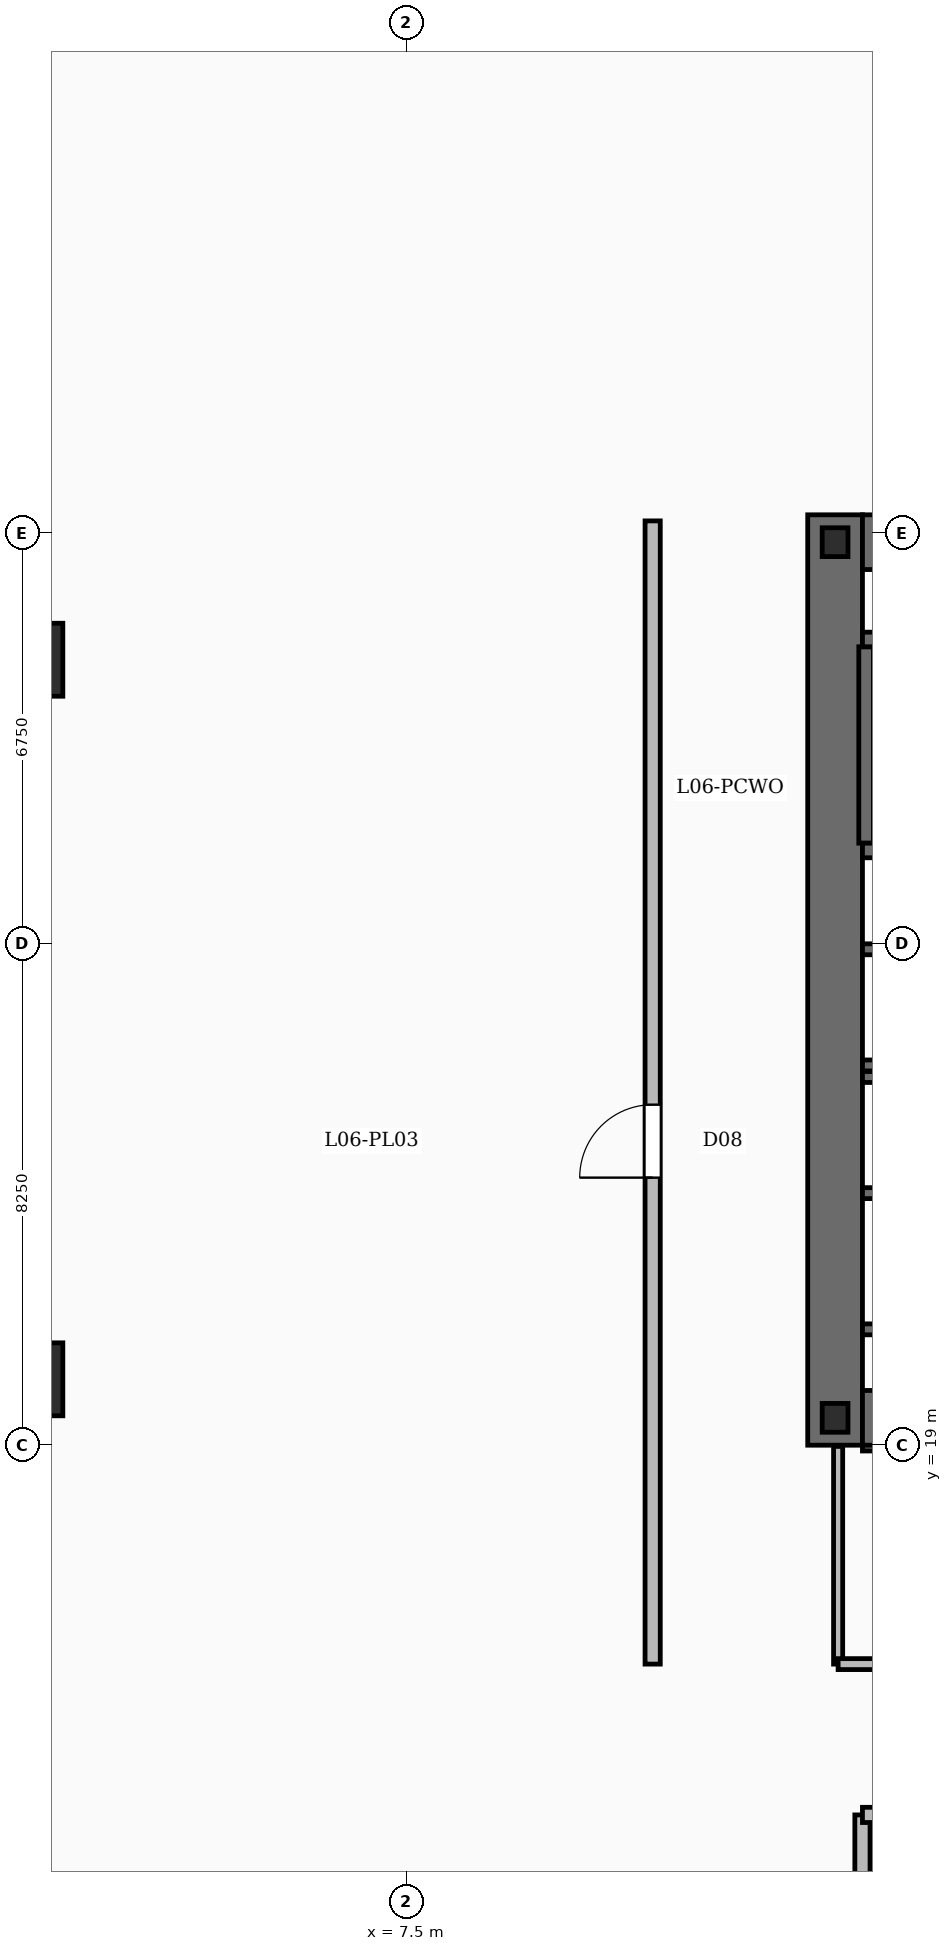
"""IFC4 building model, lengths in metres.
Left out: names, types, materials, properties, quantities, classifications, styles, units other than length and angle.
Written with IfcOpenShell. Run it as: python <this file> out.ifc"""

import sys

from ifc_helpers import new_model, si_unit, direction, frame, frame_2d, origin, origin_2d, place, context, subcontext, project, spatial, rectangle, i_section, extrude, element, fill, save


model = new_model("IFC4")
c1 = context("Model", 3, precision=1e-05, world=origin(), true_north=direction((0.0, 1.0)))
c2 = subcontext(c1, "Body", "Model", "MODEL_VIEW")
j1 = project(units=[si_unit("LENGTHUNIT", "METRE"), si_unit("PLANEANGLEUNIT", "RADIAN")], contexts=[c1])
p1 = place(None, origin())
s1 = spatial("IfcSite", under=j1, at=p1, CompositionType="ELEMENT")
p2 = place(p1, origin())
s2 = spatial("IfcBuilding", under=s1, at=p2, CompositionType="ELEMENT")
p3 = place(p2, frame((0.0, 0.0, 34.0)))
s3 = spatial("IfcBuildingStorey", under=s2, at=p3, CompositionType="ELEMENT", Elevation=34.0)
p4 = place(p3, frame((14.55, 19.0, -0.45), z_axis=(0.0, 0.0, 1.0), x_axis=(0.0, 1.0, 0.0)))
e1 = element("IfcWall", 1, at=p4, inside=s3, PredefinedType="SHEAR", context=c2, shape_type="SweptSolid", body=[
    extrude(rectangle(XDim=15.3, YDim=0.9, at=frame_2d((7.65, 0.0))), origin(), (0.0, 0.0, 1.0), 8.0),
])
for number, where, z_axis, x_axis in (
    (2, (15.0, 19.45, -0.45), (0.0, 0.0, 1.0), (1.0, 0.0, 0.0)),
    (3, (15.0, 33.85, -0.45), (0.0, 0.0, 1.0), (1.0, 0.0, 0.0)),
):
    element("IfcWall", number, at=place(p3, frame(where, z_axis=z_axis, x_axis=x_axis)), inside=s3, PredefinedType="SHEAR", context=c2, shape_type="SweptSolid", body=[
        extrude(rectangle(XDim=8.9, YDim=0.9, at=frame_2d((4.45, 0.0))), origin(), (0.0, 0.0, 1.0), 8.0),
    ])
for number, where, z_axis, x_axis in (
    (4, (14.55, 19.45, -0.45), (0.0, 0.0, 1.0), (1.0, 0.0, 0.0)),
    (5, (14.55, 33.85, -0.45), (0.0, 0.0, 1.0), (1.0, 0.0, 0.0)),
):
    element("IfcColumn", number, at=place(p3, frame(where, z_axis=z_axis, x_axis=x_axis)), inside=s3, PredefinedType="COLUMN", context=c2, shape_type="SweptSolid", body=[
        extrude(i_section(OverallWidth=0.424, OverallDepth=0.474, WebThickness=0.048, FlangeThickness=0.077, FilletRadius=0.02, at=origin_2d()), origin(), (0.0, 0.0, 1.0), 8.0),
    ])
for number, where, z_axis, x_axis in (
    (6, (1.4, 31.917, -0.45), (0.0, 0.0, 1.0), (0.0, 1.0, 0.0)),
    (7, (1.4, 20.083, -0.45), (0.0, 0.0, 1.0), (0.0, 1.0, 0.0)),
):
    element("IfcColumn", number, at=place(p3, frame(where, z_axis=z_axis, x_axis=x_axis)), inside=s3, PredefinedType="COLUMN", context=c2, shape_type="SweptSolid", body=[
        extrude(rectangle(XDim=1.2, YDim=0.9, at=origin_2d()), origin(), (0.0, 0.0, 1.0), 8.0),
    ])
p5 = place(p3, frame((23.9, 28.78, 0.0), z_axis=(0.0, 0.0, 1.0), x_axis=(-1.0, 0.0, 0.0)))
e8 = element("IfcWall", 8, at=p5, inside=s3, PredefinedType="SOLIDWALL", context=c2, shape_type="SweptSolid", body=[
    extrude(rectangle(XDim=8.9, YDim=0.24, at=frame_2d((4.45, 0.0))), origin(), (0.0, 0.0, 1.0), 7.55),
])
p6 = place(p5, frame((7.38, 0.0, 0.0)))
e9 = element("IfcOpeningElement", 9, at=p6, cuts=e8, PredefinedType="OPENING", context=c2, shape_type="SweptSolid", body=[
    extrude(rectangle(XDim=1.1, YDim=2.15, at=frame_2d((0.55, 1.075))), frame((0.0, 0.13, 0.0), z_axis=(0.0, -1.0, 0.0), x_axis=(1.0, 0.0, 0.0)), (0.0, 0.0, 1.0), 0.26),
])
p7 = place(p3, frame((15.0, 32.25, 0.0), z_axis=(0.0, 0.0, 1.0), x_axis=(1.0, 0.0, 0.0)))
e10 = element("IfcWall", 10, at=p7, inside=s3, PredefinedType="SOLIDWALL", context=c2, shape_type="SweptSolid", body=[
    extrude(rectangle(XDim=8.9, YDim=0.24, at=frame_2d((4.45, 0.0))), origin(), (0.0, 0.0, 1.0), 7.55),
])
p8 = place(p3, frame((15.06, 28.9, 0.0), z_axis=(0.0, 0.0, 1.0), x_axis=(0.0, 1.0, 0.0)))
e11 = element("IfcWall", 11, at=p8, inside=s3, PredefinedType="SOLIDWALL", context=c2, shape_type="SweptSolid", body=[
    extrude(rectangle(XDim=3.23, YDim=0.24, at=frame_2d((1.615, 0.0))), origin(), (0.0, 0.0, 1.0), 7.55),
])
for number, where, z_axis, x_axis in (
    (12, (15.0, 20.905, 0.0), (0.0, 0.0, 1.0), (1.0, 0.0, 0.0)),
    (13, (15.0, 18.995, 0.0), (0.0, 0.0, 1.0), (1.0, 0.0, 0.0)),
):
    element("IfcWall", number, at=place(p3, frame(where, z_axis=z_axis, x_axis=x_axis)), inside=s3, PredefinedType="SOLIDWALL", context=c2, shape_type="SweptSolid", body=[
        extrude(rectangle(XDim=3.3, YDim=0.18, at=frame_2d((1.65, 0.0))), origin(), (0.0, 0.0, 1.0), 7.55),
    ])
for number, where, z_axis, x_axis in (
    (14, (15.0, 25.055, 0.0), (0.0, 0.0, 1.0), (1.0, 0.0, 0.0)),
    (15, (15.0, 23.145, 0.0), (0.0, 0.0, 1.0), (1.0, 0.0, 0.0)),
):
    element("IfcWall", number, at=place(p3, frame(where, z_axis=z_axis, x_axis=x_axis)), inside=s3, PredefinedType="SOLIDWALL", context=c2, shape_type="SweptSolid", body=[
        extrude(rectangle(XDim=3.262, YDim=0.18, at=frame_2d((1.631, 0.0))), origin(), (0.0, 0.0, 1.0), 7.55),
    ])
p9 = place(p3, frame((15.0, 27.155, 0.0), z_axis=(0.0, 0.0, 1.0), x_axis=(1.0, 0.0, 0.0)))
e16 = element("IfcWall", 16, at=p9, inside=s3, PredefinedType="SOLIDWALL", context=c2, shape_type="SweptSolid", body=[
    extrude(rectangle(XDim=3.53, YDim=0.18, at=frame_2d((1.765, 0.0))), origin(), (0.0, 0.0, 1.0), 7.55),
])
p10 = place(p9, frame((1.525, 0.0, 0.0)))
e17 = element("IfcOpeningElement", 17, at=p10, cuts=e16, PredefinedType="OPENING", context=c2, shape_type="SweptSolid", body=[
    extrude(rectangle(XDim=1.35, YDim=2.3, at=frame_2d((0.675, 1.15))), frame((0.0, 0.1, 0.0), z_axis=(0.0, -1.0, 0.0), x_axis=(1.0, 0.0, 0.0)), (0.0, 0.0, 1.0), 0.2),
])
p11 = place(p3, frame((15.0, 25.245, 0.0), z_axis=(0.0, 0.0, 1.0), x_axis=(1.0, 0.0, 0.0)))
e18 = element("IfcWall", 18, at=p11, inside=s3, PredefinedType="SOLIDWALL", context=c2, shape_type="SweptSolid", body=[
    extrude(rectangle(XDim=3.53, YDim=0.18, at=frame_2d((1.765, 0.0))), origin(), (0.0, 0.0, 1.0), 7.55),
])
p12 = place(p3, frame((14.6, 15.4, 0.0), z_axis=(0.0, 0.0, 1.0), x_axis=(1.0, 0.0, 0.0)))
e19 = element("IfcWall", 19, at=p12, inside=s3, PredefinedType="PARTITIONING", context=c2, shape_type="SweptSolid", body=[
    extrude(rectangle(XDim=9.9, YDim=0.18, at=frame_2d((4.95, 0.0))), origin(), (0.0, 0.0, 1.0), 6.61),
])
p13 = place(p12, frame((0.74, 0.0, 0.0)))
e20 = element("IfcOpeningElement", 20, at=p13, cuts=e19, PredefinedType="OPENING", context=c2, shape_type="SweptSolid", body=[
    extrude(rectangle(XDim=0.92, YDim=2.1, at=frame_2d((0.46, 1.05))), frame((0.0, 0.1, 0.0), z_axis=(0.0, -1.0, 0.0), x_axis=(1.0, 0.0, 0.0)), (0.0, 0.0, 1.0), 0.2),
])
p14 = place(p12, frame((3.19, 0.0, 0.0)))
e21 = element("IfcOpeningElement", 21, at=p14, cuts=e19, PredefinedType="OPENING", context=c2, shape_type="SweptSolid", body=[
    extrude(rectangle(XDim=0.92, YDim=2.1, at=frame_2d((0.46, 1.05))), frame((0.0, 0.1, 0.0), z_axis=(0.0, -1.0, 0.0), x_axis=(1.0, 0.0, 0.0)), (0.0, 0.0, 1.0), 0.2),
])
p15 = place(p12, frame((5.69, 0.0, 0.0)))
e22 = element("IfcOpeningElement", 22, at=p15, cuts=e19, PredefinedType="OPENING", context=c2, shape_type="SweptSolid", body=[
    extrude(rectangle(XDim=0.92, YDim=2.1, at=frame_2d((0.46, 1.05))), frame((0.0, 0.1, 0.0), z_axis=(0.0, -1.0, 0.0), x_axis=(1.0, 0.0, 0.0)), (0.0, 0.0, 1.0), 0.2),
])
p16 = place(p12, frame((8.19, 0.0, 0.0)))
e23 = element("IfcOpeningElement", 23, at=p16, cuts=e19, PredefinedType="OPENING", context=c2, shape_type="SweptSolid", body=[
    extrude(rectangle(XDim=0.92, YDim=2.1, at=frame_2d((0.46, 1.05))), frame((0.0, 0.1, 0.0), z_axis=(0.0, -1.0, 0.0), x_axis=(1.0, 0.0, 0.0)), (0.0, 0.0, 1.0), 0.2),
])
p17 = place(p3, frame((14.6, 15.4, 0.0), z_axis=(0.0, 0.0, 1.0), x_axis=(0.0, 1.0, 0.0)))
e24 = element("IfcWall", 24, at=p17, inside=s3, PredefinedType="PARTITIONING", context=c2, shape_type="SweptSolid", body=[
    extrude(rectangle(XDim=3.58, YDim=0.15, at=frame_2d((1.79, 0.0))), origin(), (0.0, 0.0, 1.0), 6.61),
])
p18 = place(p3, frame((11.55, 15.4, 0.0), z_axis=(0.0, 0.0, 1.0), x_axis=(0.0, 1.0, 0.0)))
e25 = element("IfcWall", 25, at=p18, inside=s3, PredefinedType="SOLIDWALL", context=c2, shape_type="SweptSolid", body=[
    extrude(rectangle(XDim=18.8, YDim=0.25, at=frame_2d((9.4, 0.0))), origin(), (0.0, 0.0, 1.0), 6.61),
])
p19 = place(p18, frame((8.0, 0.0, 0.0)))
e26 = element("IfcOpeningElement", 26, at=p19, cuts=e25, PredefinedType="OPENING", context=c2, shape_type="SweptSolid", body=[
    extrude(rectangle(XDim=1.2, YDim=2.2, at=frame_2d((0.6, 1.1))), frame((0.0, 0.135, 0.0), z_axis=(0.0, -1.0, 0.0), x_axis=(1.0, 0.0, 0.0)), (0.0, 0.0, 1.0), 0.27),
])
p20 = place(p3, frame((15.0, 12.92, 0.0), z_axis=(0.0, 0.0, 1.0), x_axis=(1.0, 0.0, 0.0)))
e27 = element("IfcWall", 27, at=p20, inside=s3, PredefinedType="SOLIDWALL", context=c2, shape_type="SweptSolid", body=[
    extrude(rectangle(XDim=9.2, YDim=0.25, at=frame_2d((4.6, 0.0))), origin(), (0.0, 0.0, 1.0), 6.61),
])
p21 = place(p20, frame((4.05, 0.0, 0.0)))
e28 = element("IfcOpeningElement", 28, at=p21, cuts=e27, PredefinedType="OPENING", context=c2, shape_type="SweptSolid", body=[
    extrude(rectangle(XDim=1.1, YDim=2.15, at=frame_2d((0.55, 1.075))), frame((0.0, 0.135, 0.0), z_axis=(0.0, -1.0, 0.0), x_axis=(1.0, 0.0, 0.0)), (0.0, 0.0, 1.0), 0.27),
])
p22 = place(p3, frame((15.0, 3.06, 0.0), z_axis=(0.0, 0.0, 1.0), x_axis=(0.0, 1.0, 0.0)))
e29 = element("IfcWall", 29, at=p22, inside=s3, PredefinedType="SOLIDWALL", context=c2, shape_type="SweptSolid", body=[
    extrude(rectangle(XDim=9.86, YDim=0.25, at=frame_2d((4.93, 0.0))), origin(), (0.0, 0.0, 1.0), 6.61),
])
p23 = place(p19, origin())
e30 = element("IfcDoor", 30, at=p23, inside=s3, OperationType="SINGLE_SWING_LEFT", PredefinedType="DOOR", context=c2, shape_type="SweptSolid", body=[
    extrude(rectangle(XDim=1.2, YDim=2.2, at=frame_2d((0.6, 1.1))), frame((0.0, 0.025, 0.0), z_axis=(0.0, -1.0, 0.0), x_axis=(1.0, 0.0, 0.0)), (0.0, 0.0, 1.0), 0.05),
])
fill(e26, e30)
save(model, sys.argv[1])
